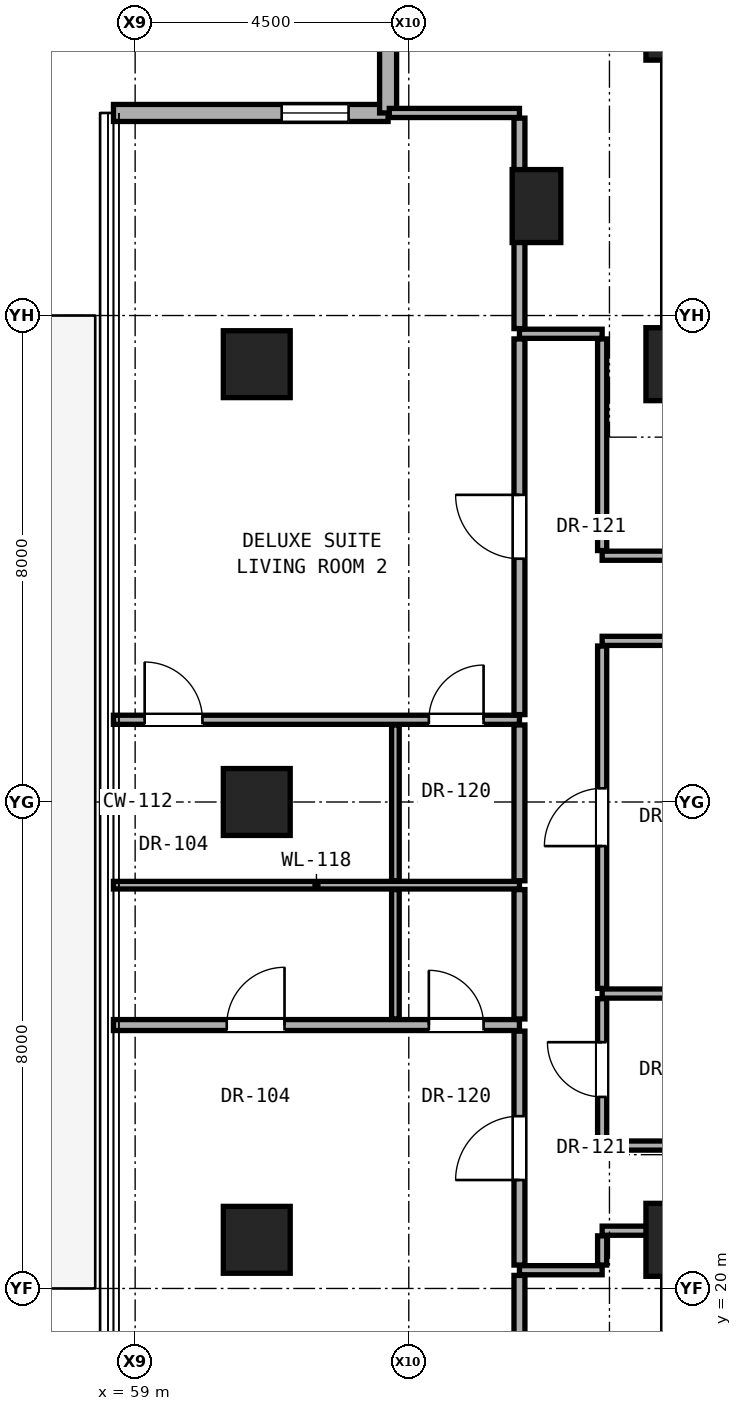
"""IFC4 building model, lengths in metres.
Left out: names, types, materials, properties, quantities, classifications, styles, units other than length and angle.
Written with IfcOpenShell. Run it as: python <this file> out.ifc"""

import sys

from ifc_helpers import new_model, si_unit, direction, frame, frame_2d, origin, origin_2d, place, context, subcontext, project, spatial, rectangle, hollow_rectangle, extrude, element, fill, save


model = new_model("IFC4")
c1 = context("Model", 3, precision=1e-05, world=origin(), true_north=direction((0.0, 1.0)))
c2 = subcontext(c1, "Body", "Model", "MODEL_VIEW")
j1 = project(units=[si_unit("LENGTHUNIT", "METRE"), si_unit("PLANEANGLEUNIT", "RADIAN")], contexts=[c1])
p1 = place(None, origin())
s1 = spatial("IfcSite", under=j1, at=p1, CompositionType="ELEMENT")
p2 = place(p1, origin())
s2 = spatial("IfcBuilding", under=s1, at=p2, CompositionType="ELEMENT")
p3 = place(p2, frame((0.0, 0.0, 98.3)))
s3 = spatial("IfcBuildingStorey", under=s2, at=p3, CompositionType="ELEMENT", Elevation=98.3)
for number, where, z_axis, x_axis in (
    (1, (68.0, 20.8, 0.0), (0.0, 0.0, 1.0), (1.0, 0.0, 0.0)),
    (2, (68.0, 35.2, 0.0), (0.0, 0.0, 1.0), (1.0, 0.0, 0.0)),
    (3, (68.0, 40.8, 0.0), (0.0, 0.0, 1.0), (1.0, 0.0, 0.0)),
):
    element("IfcColumn", number, at=place(p3, frame(where, z_axis=z_axis, x_axis=x_axis)), inside=s3, PredefinedType="COLUMN", context=c2, shape_type="SweptSolid", body=[
        extrude(rectangle(XDim=1.2, YDim=1.2, at=origin_2d()), origin(), (0.0, 0.0, 1.0), 3.3),
    ])
for number, where, z_axis, x_axis in (
    (4, (61.0, 20.8, 0.0), (0.0, 0.0, 1.0), (1.0, 0.0, 0.0)),
    (5, (61.0, 28.0, 0.0), (0.0, 0.0, 1.0), (1.0, 0.0, 0.0)),
    (6, (61.0, 35.2, 0.0), (0.0, 0.0, 1.0), (1.0, 0.0, 0.0)),
):
    element("IfcColumn", number, at=place(p3, frame(where, z_axis=z_axis, x_axis=x_axis)), inside=s3, PredefinedType="COLUMN", context=c2, shape_type="SweptSolid", body=[
        extrude(hollow_rectangle(XDim=1.1, YDim=1.1, WallThickness=0.06, at=origin_2d()), origin(), (0.0, 0.0, 1.0), 3.3),
    ])
p4 = place(p3, frame((65.6, 37.8, 0.0), z_axis=(0.0, 0.0, 1.0), x_axis=(1.0, 0.0, 0.0)))
e7 = element("IfcColumn", 7, at=p4, inside=s3, PredefinedType="PILASTER", context=c2, shape_type="SweptSolid", body=[
    extrude(rectangle(XDim=0.8, YDim=1.2, at=origin_2d()), origin(), (0.0, 0.0, 1.0), 3.3),
])
for number, where, z_axis, x_axis in (
    (8, (68.0, 35.2, 0.0), (0.0, 0.0, 1.0), (0.0, 1.0, 0.0)),
    (9, (68.0, 15.2, 0.0), (0.0, 0.0, 1.0), (0.0, 1.0, 0.0)),
):
    element("IfcWall", number, at=place(p3, frame(where, z_axis=z_axis, x_axis=x_axis)), inside=s3, PredefinedType="SHEAR", context=c2, shape_type="SweptSolid", body=[
        extrude(rectangle(XDim=5.6, YDim=0.65, at=frame_2d((2.8, 0.0))), origin(), (0.0, 0.0, 1.0), 3.08),
    ])
p5 = place(p3, frame((63.16, 39.331, 0.0), z_axis=(0.0, 0.0, 1.0), x_axis=(-1.0, 0.0, 0.0)))
e10 = element("IfcWall", 10, at=p5, inside=s3, PredefinedType="SOLIDWALL", context=c2, shape_type="SweptSolid", body=[
    extrude(rectangle(XDim=4.516, YDim=0.28, at=frame_2d((2.258, 0.0))), origin(), (0.0, 0.0, 1.0), 3.06),
])
p6 = place(p5, frame((0.65, 0.0, 0.85)))
e11 = element("IfcOpeningElement", 11, at=p6, cuts=e10, PredefinedType="OPENING", context=c2, shape_type="SweptSolid", body=[
    extrude(rectangle(XDim=1.1, YDim=2.0, at=frame_2d((0.55, 1.0))), frame((0.0, 0.15, 0.0), z_axis=(0.0, -1.0, 0.0), x_axis=(1.0, 0.0, 0.0)), (0.0, 0.0, 1.0), 0.3),
])
p7 = place(p3, frame((63.16, 43.847, 0.0), z_axis=(0.0, 0.0, 1.0), x_axis=(0.0, -1.0, 0.0)))
e12 = element("IfcWall", 12, at=p7, inside=s3, PredefinedType="SOLIDWALL", context=c2, shape_type="SweptSolid", body=[
    extrude(rectangle(XDim=4.516, YDim=0.28, at=frame_2d((2.258, 0.0))), origin(), (0.0, 0.0, 1.0), 3.06),
])
p8 = place(p3, frame((65.32, 20.3, 0.0), z_axis=(0.0, 0.0, 1.0), x_axis=(1.0, 0.0, 0.0)))
e13 = element("IfcWall", 13, at=p8, inside=s3, PredefinedType="PARTITIONING", context=c2, shape_type="SweptSolid", body=[
    extrude(rectangle(XDim=1.36, YDim=0.15, at=frame_2d((0.68, 0.0))), origin(), (0.0, 0.0, 1.0), 3.08),
])
p9 = place(p3, frame((66.68, 20.95, 0.0), z_axis=(0.0, 0.0, 1.0), x_axis=(1.0, 0.0, 0.0)))
e14 = element("IfcWall", 14, at=p9, inside=s3, PredefinedType="PARTITIONING", context=c2, shape_type="SweptSolid", body=[
    extrude(rectangle(XDim=1.0, YDim=0.15, at=frame_2d((0.5, 0.0))), origin(), (0.0, 0.0, 1.0), 2.472),
])
p10 = place(p3, frame((66.68, 22.35, 0.0), z_axis=(0.0, 0.0, 1.0), x_axis=(1.0, 0.0, 0.0)))
e15 = element("IfcWall", 15, at=p10, inside=s3, PredefinedType="PARTITIONING", context=c2, shape_type="SweptSolid", body=[
    extrude(rectangle(XDim=19.5, YDim=0.15, at=frame_2d((9.75, 0.0))), origin(), (0.0, 0.0, 1.0), 2.145),
])
p11 = place(p10, frame((8.902, 0.0, 0.0)))
e16 = element("IfcOpeningElement", 16, at=p11, cuts=e15, PredefinedType="OPENING", context=c2, shape_type="SweptSolid", body=[
    extrude(rectangle(XDim=0.85, YDim=2.01, at=frame_2d((0.425, 1.005))), frame((0.0, 0.085, 0.0), z_axis=(0.0, -1.0, 0.0), x_axis=(1.0, 0.0, 0.0)), (0.0, 0.0, 1.0), 0.17),
])
p12 = place(p10, frame((15.947, 0.0, 0.0)))
e17 = element("IfcOpeningElement", 17, at=p12, cuts=e15, PredefinedType="OPENING", context=c2, shape_type="SweptSolid", body=[
    extrude(rectangle(XDim=0.85, YDim=2.01, at=frame_2d((0.425, 1.005))), frame((0.0, 0.085, 0.0), z_axis=(0.0, -1.0, 0.0), x_axis=(1.0, 0.0, 0.0)), (0.0, 0.0, 1.0), 0.17),
])
p13 = place(p3, frame((58.643, 24.332, 0.0), z_axis=(0.0, 0.0, 1.0), x_axis=(1.0, 0.0, 0.0)))
e18 = element("IfcWall", 18, at=p13, inside=s3, PredefinedType="PARTITIONING", context=c2, shape_type="SweptSolid", body=[
    extrude(rectangle(XDim=6.677, YDim=0.18, at=frame_2d((3.338, 0.0))), origin(), (0.0, 0.0, 1.0), 2.216),
])
p14 = place(p13, frame((1.864, 0.0, 0.0)))
e19 = element("IfcOpeningElement", 19, at=p14, cuts=e18, PredefinedType="OPENING", context=c2, shape_type="SweptSolid", body=[
    extrude(rectangle(XDim=0.95, YDim=2.15, at=frame_2d((0.475, 1.075))), frame((0.0, 0.1, 0.0), z_axis=(0.0, -1.0, 0.0), x_axis=(1.0, 0.0, 0.0)), (0.0, 0.0, 1.0), 0.2),
])
p15 = place(p13, frame((5.187, 0.0, 0.0)))
e20 = element("IfcOpeningElement", 20, at=p15, cuts=e18, PredefinedType="OPENING", context=c2, shape_type="SweptSolid", body=[
    extrude(rectangle(XDim=0.9, YDim=2.1, at=frame_2d((0.45, 1.05))), frame((0.0, 0.1, 0.0), z_axis=(0.0, -1.0, 0.0), x_axis=(1.0, 0.0, 0.0)), (0.0, 0.0, 1.0), 0.2),
])
p16 = place(p3, frame((66.68, 24.85, 0.0), z_axis=(0.0, 0.0, 1.0), x_axis=(1.0, 0.0, 0.0)))
e21 = element("IfcWall", 21, at=p16, inside=s3, PredefinedType="PARTITIONING", context=c2, shape_type="SweptSolid", body=[
    extrude(rectangle(XDim=3.07, YDim=0.15, at=frame_2d((1.535, 0.0))), origin(), (0.0, 0.0, 1.0), 2.145),
])
p17 = place(p3, frame((58.643, 26.632, 0.0), z_axis=(0.0, 0.0, 1.0), x_axis=(1.0, 0.0, 0.0)))
e22 = element("IfcWall", 22, at=p17, inside=s3, PredefinedType="PARTITIONING", context=c2, shape_type="SweptSolid", body=[
    extrude(rectangle(XDim=6.677, YDim=0.125, at=frame_2d((3.338, 0.0))), origin(), (0.0, 0.0, 1.0), 2.216),
])
p18 = place(p3, frame((58.643, 29.352, 0.0), z_axis=(0.0, 0.0, 1.0), x_axis=(1.0, 0.0, 0.0)))
e23 = element("IfcWall", 23, at=p18, inside=s3, PredefinedType="PARTITIONING", context=c2, shape_type="SweptSolid", body=[
    extrude(rectangle(XDim=6.677, YDim=0.15, at=frame_2d((3.338, 0.0))), origin(), (0.0, 0.0, 1.0), 2.216),
])
p19 = place(p18, frame((0.513, 0.0, 0.0)))
e24 = element("IfcOpeningElement", 24, at=p19, cuts=e23, PredefinedType="OPENING", context=c2, shape_type="SweptSolid", body=[
    extrude(rectangle(XDim=0.95, YDim=2.15, at=frame_2d((0.475, 1.075))), frame((0.0, 0.085, 0.0), z_axis=(0.0, -1.0, 0.0), x_axis=(1.0, 0.0, 0.0)), (0.0, 0.0, 1.0), 0.17),
])
p20 = place(p18, frame((5.187, 0.0, 0.0)))
e25 = element("IfcOpeningElement", 25, at=p20, cuts=e23, PredefinedType="OPENING", context=c2, shape_type="SweptSolid", body=[
    extrude(rectangle(XDim=0.9, YDim=2.1, at=frame_2d((0.45, 1.05))), frame((0.0, 0.085, 0.0), z_axis=(0.0, -1.0, 0.0), x_axis=(1.0, 0.0, 0.0)), (0.0, 0.0, 1.0), 0.17),
])
p21 = place(p3, frame((66.68, 30.65, 0.0), z_axis=(0.0, 0.0, 1.0), x_axis=(1.0, 0.0, 0.0)))
e26 = element("IfcWall", 26, at=p21, inside=s3, PredefinedType="PARTITIONING", context=c2, shape_type="SweptSolid", body=[
    extrude(rectangle(XDim=19.5, YDim=0.15, at=frame_2d((9.75, 0.0))), origin(), (0.0, 0.0, 1.0), 2.145),
])
p22 = place(p21, frame((3.795, 0.0, 0.0)))
e27 = element("IfcOpeningElement", 27, at=p22, cuts=e26, PredefinedType="OPENING", context=c2, shape_type="SweptSolid", body=[
    extrude(rectangle(XDim=0.85, YDim=2.01, at=frame_2d((0.425, 1.005))), frame((0.0, 0.085, 0.0), z_axis=(0.0, -1.0, 0.0), x_axis=(1.0, 0.0, 0.0)), (0.0, 0.0, 1.0), 0.17),
])
p23 = place(p21, frame((8.902, 0.0, 0.0)))
e28 = element("IfcOpeningElement", 28, at=p23, cuts=e26, PredefinedType="OPENING", context=c2, shape_type="SweptSolid", body=[
    extrude(rectangle(XDim=0.85, YDim=2.01, at=frame_2d((0.425, 1.005))), frame((0.0, 0.085, 0.0), z_axis=(0.0, -1.0, 0.0), x_axis=(1.0, 0.0, 0.0)), (0.0, 0.0, 1.0), 0.17),
])
p24 = place(p21, frame((15.947, 0.0, 0.0)))
e29 = element("IfcOpeningElement", 29, at=p24, cuts=e26, PredefinedType="OPENING", context=c2, shape_type="SweptSolid", body=[
    extrude(rectangle(XDim=0.85, YDim=2.01, at=frame_2d((0.425, 1.005))), frame((0.0, 0.085, 0.0), z_axis=(0.0, -1.0, 0.0), x_axis=(1.0, 0.0, 0.0)), (0.0, 0.0, 1.0), 0.17),
])
p25 = place(p3, frame((66.68, 32.05, 0.0), z_axis=(0.0, 0.0, 1.0), x_axis=(1.0, 0.0, 0.0)))
e30 = element("IfcWall", 30, at=p25, inside=s3, PredefinedType="PARTITIONING", context=c2, shape_type="SweptSolid", body=[
    extrude(rectangle(XDim=2.12, YDim=0.15, at=frame_2d((1.06, 0.0))), origin(), (0.0, 0.0, 1.0), 2.145),
])
p26 = place(p3, frame((65.32, 35.7, 0.0), z_axis=(0.0, 0.0, 1.0), x_axis=(1.0, 0.0, 0.0)))
e31 = element("IfcWall", 31, at=p26, inside=s3, PredefinedType="PARTITIONING", context=c2, shape_type="SweptSolid", body=[
    extrude(rectangle(XDim=1.36, YDim=0.15, at=frame_2d((0.68, 0.0))), origin(), (0.0, 0.0, 1.0), 3.08),
])
p27 = place(p3, frame((63.18, 39.331, 0.0), z_axis=(0.0, 0.0, 1.0), x_axis=(1.0, 0.0, 0.0)))
e32 = element("IfcWall", 32, at=p27, inside=s3, PredefinedType="PARTITIONING", context=c2, shape_type="SweptSolid", body=[
    extrude(rectangle(XDim=2.14, YDim=0.15, at=frame_2d((1.07, 0.0))), origin(), (0.0, 0.0, 1.0), 3.08),
])
p28 = place(p3, frame((63.28, 24.432, 0.0), z_axis=(0.0, 0.0, 1.0), x_axis=(0.0, 1.0, 0.0)))
e33 = element("IfcWall", 33, at=p28, inside=s3, PredefinedType="PARTITIONING", context=c2, shape_type="SweptSolid", body=[
    extrude(rectangle(XDim=2.128, YDim=0.125, at=frame_2d((1.064, 0.0))), origin(), (0.0, 0.0, 1.0), 3.08),
])
p29 = place(p3, frame((63.28, 26.705, 0.0), z_axis=(0.0, 0.0, 1.0), x_axis=(0.0, 1.0, 0.0)))
e34 = element("IfcWall", 34, at=p29, inside=s3, PredefinedType="PARTITIONING", context=c2, shape_type="SweptSolid", body=[
    extrude(rectangle(XDim=2.562, YDim=0.125, at=frame_2d((1.281, 0.0))), origin(), (0.0, 0.0, 1.0), 2.299),
])
p30 = place(p3, frame((65.32, 16.769, 0.0), z_axis=(0.0, 0.0, 1.0), x_axis=(0.0, 1.0, 0.0)))
e35 = element("IfcWall", 35, at=p30, inside=s3, PredefinedType="PARTITIONING", context=c2, shape_type="SweptSolid", body=[
    extrude(rectangle(XDim=3.446, YDim=0.18, at=frame_2d((1.723, 0.0))), origin(), (0.0, 0.0, 1.0), 2.456),
])
p31 = place(p3, frame((65.32, 20.385, 0.0), z_axis=(0.0, 0.0, 1.0), x_axis=(0.0, 1.0, 0.0)))
e36 = element("IfcWall", 36, at=p31, inside=s3, PredefinedType="PARTITIONING", context=c2, shape_type="SweptSolid", body=[
    extrude(rectangle(XDim=3.847, YDim=0.18, at=frame_2d((1.923, 0.0))), origin(), (0.0, 0.0, 1.0), 2.472),
])
p32 = place(p31, frame((1.398, 0.0, 0.0)))
e37 = element("IfcOpeningElement", 37, at=p32, cuts=e36, PredefinedType="OPENING", context=c2, shape_type="SweptSolid", body=[
    extrude(rectangle(XDim=1.05, YDim=2.2, at=frame_2d((0.525, 1.1))), frame((0.0, 0.1, 0.0), z_axis=(0.0, -1.0, 0.0), x_axis=(1.0, 0.0, 0.0)), (0.0, 0.0, 1.0), 0.2),
])
p33 = place(p3, frame((65.32, 24.432, 0.0), z_axis=(0.0, 0.0, 1.0), x_axis=(0.0, 1.0, 0.0)))
e38 = element("IfcWall", 38, at=p33, inside=s3, PredefinedType="PARTITIONING", context=c2, shape_type="SweptSolid", body=[
    extrude(rectangle(XDim=2.128, YDim=0.18, at=frame_2d((1.064, 0.0))), origin(), (0.0, 0.0, 1.0), 3.08),
])
p34 = place(p3, frame((65.32, 26.705, 0.0), z_axis=(0.0, 0.0, 1.0), x_axis=(0.0, 1.0, 0.0)))
e39 = element("IfcWall", 39, at=p34, inside=s3, PredefinedType="PARTITIONING", context=c2, shape_type="SweptSolid", body=[
    extrude(rectangle(XDim=2.562, YDim=0.18, at=frame_2d((1.281, 0.0))), origin(), (0.0, 0.0, 1.0), 2.299),
])
p35 = place(p3, frame((65.32, 29.437, 0.0), z_axis=(0.0, 0.0, 1.0), x_axis=(0.0, 1.0, 0.0)))
e40 = element("IfcWall", 40, at=p35, inside=s3, PredefinedType="PARTITIONING", context=c2, shape_type="SweptSolid", body=[
    extrude(rectangle(XDim=6.178, YDim=0.18, at=frame_2d((3.089, 0.0))), origin(), (0.0, 0.0, 1.0), 2.472),
])
p36 = place(p35, frame((2.564, 0.0, 0.0)))
e41 = element("IfcOpeningElement", 41, at=p36, cuts=e40, PredefinedType="OPENING", context=c2, shape_type="SweptSolid", body=[
    extrude(rectangle(XDim=1.05, YDim=2.2, at=frame_2d((0.525, 1.1))), frame((0.0, 0.1, 0.0), z_axis=(0.0, -1.0, 0.0), x_axis=(1.0, 0.0, 0.0)), (0.0, 0.0, 1.0), 0.2),
])
p37 = place(p3, frame((65.32, 35.785, 0.0), z_axis=(0.0, 0.0, 1.0), x_axis=(0.0, 1.0, 0.0)))
e42 = element("IfcWall", 42, at=p37, inside=s3, PredefinedType="PARTITIONING", context=c2, shape_type="SweptSolid", body=[
    extrude(rectangle(XDim=3.461, YDim=0.18, at=frame_2d((1.73, 0.0))), origin(), (0.0, 0.0, 1.0), 2.456),
])
p38 = place(p3, frame((66.68, 20.385, 0.0), z_axis=(0.0, 0.0, 1.0), x_axis=(0.0, 1.0, 0.0)))
e43 = element("IfcWall", 43, at=p38, inside=s3, PredefinedType="PARTITIONING", context=c2, shape_type="SweptSolid", body=[
    extrude(rectangle(XDim=0.48, YDim=0.15, at=frame_2d((0.24, 0.0))), origin(), (0.0, 0.0, 1.0), 2.472),
])
p39 = place(p3, frame((66.68, 22.435, 0.0), z_axis=(0.0, 0.0, 1.0), x_axis=(0.0, 1.0, 0.0)))
e44 = element("IfcWall", 44, at=p39, inside=s3, PredefinedType="PARTITIONING", context=c2, shape_type="SweptSolid", body=[
    extrude(rectangle(XDim=2.33, YDim=0.15, at=frame_2d((1.165, 0.0))), origin(), (0.0, 0.0, 1.0), 3.08),
])
p40 = place(p39, frame((0.715, 0.0, 0.0)))
e45 = element("IfcOpeningElement", 45, at=p40, cuts=e44, PredefinedType="OPENING", context=c2, shape_type="SweptSolid", body=[
    extrude(rectangle(XDim=0.9, YDim=2.1, at=frame_2d((0.45, 1.05))), frame((0.0, 0.085, 0.0), z_axis=(0.0, -1.0, 0.0), x_axis=(1.0, 0.0, 0.0)), (0.0, 0.0, 1.0), 0.17),
])
p41 = place(p3, frame((66.68, 24.935, 0.0), z_axis=(0.0, 0.0, 1.0), x_axis=(0.0, 1.0, 0.0)))
e46 = element("IfcWall", 46, at=p41, inside=s3, PredefinedType="PARTITIONING", context=c2, shape_type="SweptSolid", body=[
    extrude(rectangle(XDim=5.63, YDim=0.15, at=frame_2d((2.815, 0.0))), origin(), (0.0, 0.0, 1.0), 2.299),
])
p42 = place(p41, frame((2.34, 0.0, 0.0)))
e47 = element("IfcOpeningElement", 47, at=p42, cuts=e46, PredefinedType="OPENING", context=c2, shape_type="SweptSolid", body=[
    extrude(rectangle(XDim=0.95, YDim=2.15, at=frame_2d((0.475, 1.075))), frame((0.0, 0.085, 0.0), z_axis=(0.0, -1.0, 0.0), x_axis=(1.0, 0.0, 0.0)), (0.0, 0.0, 1.0), 0.17),
])
p43 = place(p3, frame((66.68, 32.135, 0.0), z_axis=(0.0, 0.0, 1.0), x_axis=(0.0, 1.0, 0.0)))
e48 = element("IfcWall", 48, at=p43, inside=s3, PredefinedType="PARTITIONING", context=c2, shape_type="SweptSolid", body=[
    extrude(rectangle(XDim=3.48, YDim=0.15, at=frame_2d((1.74, 0.0))), origin(), (0.0, 0.0, 1.0), 2.472),
])
p44 = place(p6, origin())
e49 = element("IfcWindow", 49, at=p44, inside=s3, PartitioningType="SINGLE_PANEL", PredefinedType="WINDOW", context=c2, shape_type="SweptSolid", body=[
    extrude(rectangle(XDim=1.1, YDim=2.0, at=frame_2d((0.55, 1.0))), frame((0.0, 0.03, 0.0), z_axis=(0.0, -1.0, 0.0), x_axis=(1.0, 0.0, 0.0)), (0.0, 0.0, 1.0), 0.06),
])
fill(e11, e49)
p45 = place(p40, origin())
e50 = element("IfcDoor", 50, at=p45, inside=s3, OperationType="SINGLE_SWING_RIGHT", PredefinedType="DOOR", context=c2, shape_type="SweptSolid", body=[
    extrude(rectangle(XDim=0.9, YDim=2.1, at=frame_2d((0.45, 1.05))), frame((0.0, 0.025, 0.0), z_axis=(0.0, -1.0, 0.0), x_axis=(1.0, 0.0, 0.0)), (0.0, 0.0, 1.0), 0.05),
])
fill(e45, e50)
p46 = place(p32, origin())
e51 = element("IfcDoor", 51, at=p46, inside=s3, OperationType="SINGLE_SWING_LEFT", PredefinedType="DOOR", context=c2, shape_type="SweptSolid", body=[
    extrude(rectangle(XDim=1.05, YDim=2.2, at=frame_2d((0.525, 1.1))), frame((0.0, 0.025, 0.0), z_axis=(0.0, -1.0, 0.0), x_axis=(1.0, 0.0, 0.0)), (0.0, 0.0, 1.0), 0.05),
])
fill(e37, e51)
p47 = place(p14, origin())
e52 = element("IfcDoor", 52, at=p47, inside=s3, OperationType="SINGLE_SWING_RIGHT", PredefinedType="DOOR", context=c2, shape_type="SweptSolid", body=[
    extrude(rectangle(XDim=0.95, YDim=2.15, at=frame_2d((0.475, 1.075))), frame((0.0, 0.025, 0.0), z_axis=(0.0, -1.0, 0.0), x_axis=(1.0, 0.0, 0.0)), (0.0, 0.0, 1.0), 0.05),
])
fill(e19, e52)
p48 = place(p15, origin())
e53 = element("IfcDoor", 53, at=p48, inside=s3, OperationType="SINGLE_SWING_LEFT", PredefinedType="DOOR", context=c2, shape_type="SweptSolid", body=[
    extrude(rectangle(XDim=0.9, YDim=2.1, at=frame_2d((0.45, 1.05))), frame((0.0, 0.025, 0.0), z_axis=(0.0, -1.0, 0.0), x_axis=(1.0, 0.0, 0.0)), (0.0, 0.0, 1.0), 0.05),
])
fill(e20, e53)
p49 = place(p36, origin())
e54 = element("IfcDoor", 54, at=p49, inside=s3, OperationType="SINGLE_SWING_RIGHT", PredefinedType="DOOR", context=c2, shape_type="SweptSolid", body=[
    extrude(rectangle(XDim=1.05, YDim=2.2, at=frame_2d((0.525, 1.1))), frame((0.0, 0.025, 0.0), z_axis=(0.0, -1.0, 0.0), x_axis=(1.0, 0.0, 0.0)), (0.0, 0.0, 1.0), 0.05),
])
fill(e41, e54)
p50 = place(p19, origin())
e55 = element("IfcDoor", 55, at=p50, inside=s3, OperationType="SINGLE_SWING_LEFT", PredefinedType="DOOR", context=c2, shape_type="SweptSolid", body=[
    extrude(rectangle(XDim=0.95, YDim=2.15, at=frame_2d((0.475, 1.075))), frame((0.0, 0.025, 0.0), z_axis=(0.0, -1.0, 0.0), x_axis=(1.0, 0.0, 0.0)), (0.0, 0.0, 1.0), 0.05),
])
fill(e24, e55)
p51 = place(p20, origin())
e56 = element("IfcDoor", 56, at=p51, inside=s3, OperationType="SINGLE_SWING_RIGHT", PredefinedType="DOOR", context=c2, shape_type="SweptSolid", body=[
    extrude(rectangle(XDim=0.9, YDim=2.1, at=frame_2d((0.45, 1.05))), frame((0.0, 0.025, 0.0), z_axis=(0.0, -1.0, 0.0), x_axis=(1.0, 0.0, 0.0)), (0.0, 0.0, 1.0), 0.05),
])
fill(e25, e56)
p52 = place(p42, origin())
e57 = element("IfcDoor", 57, at=p52, inside=s3, OperationType="SINGLE_SWING_LEFT", PredefinedType="DOOR", context=c2, shape_type="SweptSolid", body=[
    extrude(rectangle(XDim=0.95, YDim=2.15, at=frame_2d((0.475, 1.075))), frame((0.0, 0.025, 0.0), z_axis=(0.0, -1.0, 0.0), x_axis=(1.0, 0.0, 0.0)), (0.0, 0.0, 1.0), 0.05),
])
fill(e47, e57)
save(model, sys.argv[1])
